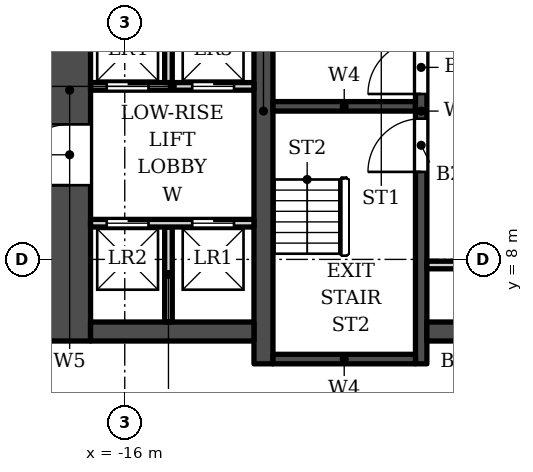
"""IFC4 building model, lengths in metres.
Left out: names, types, materials, properties, quantities, classifications, styles, units other than length and angle.
Written with IfcOpenShell. Run it as: python <this file> out.ifc"""

import sys

from ifc_helpers import new_model, si_unit, direction, frame, frame_2d, origin, place, context, subcontext, project, spatial, rectangle, extrude, element, fill, save


model = new_model("IFC4")
c1 = context("Model", 3, precision=1e-05, world=origin(), true_north=direction((0.0, 1.0)))
c2 = subcontext(c1, "Body", "Model", "MODEL_VIEW")
j1 = project(units=[si_unit("LENGTHUNIT", "METRE"), si_unit("PLANEANGLEUNIT", "RADIAN")], contexts=[c1])
p1 = place(None, origin())
s1 = spatial("IfcSite", under=j1, at=p1, CompositionType="ELEMENT")
p2 = place(p1, origin())
s2 = spatial("IfcBuilding", under=s1, at=p2, CompositionType="ELEMENT")
p3 = place(p2, frame((0.0, 0.0, -10.0)))
s3 = spatial("IfcBuildingStorey", under=s2, at=p3, CompositionType="ELEMENT", Elevation=-10.0)
p4 = place(p3, frame((-12.35, 5.253, -1.6), z_axis=(0.0, 0.0, 1.0), x_axis=(0.0, 1.0, 0.0)))
e1 = element("IfcWall", 1, at=p4, inside=s3, PredefinedType="SHEAR", context=c2, shape_type="SweptSolid", body=[
    extrude(rectangle(XDim=13.3, YDim=0.5, at=frame_2d((6.65, 0.0))), origin(), (0.0, 0.0, 1.0), 6.6),
])
p5 = place(p3, frame((-8.2, 5.253, -1.6), z_axis=(0.0, 0.0, 1.0), x_axis=(0.0, 1.0, 0.0)))
e2 = element("IfcWall", 2, at=p5, inside=s3, PredefinedType="SHEAR", context=c2, shape_type="SweptSolid", body=[
    extrude(rectangle(XDim=13.3, YDim=0.3, at=frame_2d((6.65, 0.0))), origin(), (0.0, 0.0, 1.0), 6.6),
])
p6 = place(p5, frame((7.1, 0.0, 1.6)))
e3 = element("IfcOpeningElement", 3, at=p6, cuts=e2, PredefinedType="OPENING", context=c2, shape_type="SweptSolid", body=[
    extrude(rectangle(XDim=1.4, YDim=2.1, at=frame_2d((0.7, 1.05))), frame((0.0, 0.16, 0.0), z_axis=(0.0, -1.0, 0.0), x_axis=(1.0, 0.0, 0.0)), (0.0, 0.0, 1.0), 0.32),
])
p7 = place(p5, frame((5.05, 0.0, 1.6)))
e4 = element("IfcOpeningElement", 4, at=p7, cuts=e2, PredefinedType="OPENING", context=c2, shape_type="SweptSolid", body=[
    extrude(rectangle(XDim=1.4, YDim=2.1, at=frame_2d((0.7, 1.05))), frame((0.0, 0.16, 0.0), z_axis=(0.0, -1.0, 0.0), x_axis=(1.0, 0.0, 0.0)), (0.0, 0.0, 1.0), 0.32),
])
for number, where, z_axis, x_axis in (
    (5, (-12.1, 12.028, -1.6), (0.0, 0.0, 1.0), (1.0, 0.0, 0.0)),
    (6, (-12.1, 5.378, -1.6), (0.0, 0.0, 1.0), (1.0, 0.0, 0.0)),
):
    element("IfcWall", number, at=place(p3, frame(where, z_axis=z_axis, x_axis=x_axis)), inside=s3, PredefinedType="SHEAR", context=c2, shape_type="SweptSolid", body=[
        extrude(rectangle(XDim=3.75, YDim=0.25, at=frame_2d((1.875, 0.0))), origin(), (0.0, 0.0, 1.0), 6.6),
    ])
p8 = place(p3, frame((-8.05, 6.103, -1.6), z_axis=(0.0, 0.0, 1.0), x_axis=(1.0, 0.0, 0.0)))
e7 = element("IfcWall", 7, at=p8, inside=s3, PredefinedType="SHEAR", context=c2, shape_type="SweptSolid", body=[
    extrude(rectangle(XDim=7.05, YDim=0.5, at=frame_2d((3.525, 0.0))), origin(), (0.0, 0.0, 1.0), 6.6),
])
p9 = place(p8, frame((0.825, 0.0, 1.6)))
e8 = element("IfcOpeningElement", 8, at=p9, cuts=e7, PredefinedType="OPENING", context=c2, shape_type="SweptSolid", body=[
    extrude(rectangle(XDim=0.9, YDim=2.1, at=frame_2d((0.45, 1.05))), frame((0.0, 0.26, 0.0), z_axis=(0.0, -1.0, 0.0), x_axis=(1.0, 0.0, 0.0)), (0.0, 0.0, 1.0), 0.52),
])
p10 = place(p3, frame((-12.6, 6.103, -1.6), z_axis=(0.0, 0.0, 1.0), x_axis=(-1.0, 0.0, 0.0)))
e9 = element("IfcWall", 9, at=p10, inside=s3, PredefinedType="SHEAR", context=c2, shape_type="SweptSolid", body=[
    extrude(rectangle(XDim=4.3, YDim=0.5, at=frame_2d((2.15, 0.0))), origin(), (0.0, 0.0, 1.0), 6.6),
])
p11 = place(p3, frame((-17.45, 5.853, -1.6), z_axis=(0.0, 0.0, 1.0), x_axis=(0.0, 1.0, 0.0)))
e10 = element("IfcWall", 10, at=p11, inside=s3, PredefinedType="SHEAR", context=c2, shape_type="SweptSolid", body=[
    extrude(rectangle(XDim=13.2, YDim=1.1, at=frame_2d((6.6, 0.0))), origin(), (0.0, 0.0, 1.0), 6.6),
])
p12 = place(p11, frame((4.1, 0.0, 1.6)))
e11 = element("IfcOpeningElement", 11, at=p12, cuts=e10, PredefinedType="OPENING", context=c2, shape_type="SweptSolid", body=[
    extrude(rectangle(XDim=1.6, YDim=2.1, at=frame_2d((0.8, 1.05))), frame((0.0, 0.56, 0.0), z_axis=(0.0, -1.0, 0.0), x_axis=(1.0, 0.0, 0.0)), (0.0, 0.0, 1.0), 1.12),
])
p13 = place(p11, frame((9.75, 0.0, 1.6)))
e12 = element("IfcOpeningElement", 12, at=p13, cuts=e10, PredefinedType="OPENING", context=c2, shape_type="SweptSolid", body=[
    extrude(rectangle(XDim=0.9, YDim=2.1, at=frame_2d((0.45, 1.05))), frame((0.0, 0.56, 0.0), z_axis=(0.0, -1.0, 0.0), x_axis=(1.0, 0.0, 0.0)), (0.0, 0.0, 1.0), 1.12),
])
for number, where, z_axis, x_axis in (
    (13, (-14.85, 6.353, 0.0), (0.0, 0.0, 1.0), (0.0, 1.0, 0.0)),
    (14, (-8.05, 7.853, 0.0), (0.0, 0.0, 1.0), (1.0, 0.0, 0.0)),
):
    element("IfcWall", number, at=place(p3, frame(where, z_axis=z_axis, x_axis=x_axis)), inside=s3, PredefinedType="SOLIDWALL", context=c2, shape_type="SweptSolid", body=[
        extrude(rectangle(XDim=2.5, YDim=0.2, at=frame_2d((1.25, 0.0))), origin(), (0.0, 0.0, 1.0), 4.5),
    ])
p14 = place(p3, frame((-16.9, 8.953, 0.0), z_axis=(0.0, 0.0, 1.0), x_axis=(1.0, 0.0, 0.0)))
e15 = element("IfcWall", 15, at=p14, inside=s3, PredefinedType="SOLIDWALL", context=c2, shape_type="SweptSolid", body=[
    extrude(rectangle(XDim=4.3, YDim=0.2, at=frame_2d((2.15, 0.0))), origin(), (0.0, 0.0, 1.0), 4.5),
])
p15 = place(p14, frame((2.675, 0.0, 0.0)))
e16 = element("IfcOpeningElement", 16, at=p15, cuts=e15, PredefinedType="OPENING", context=c2, shape_type="SweptSolid", body=[
    extrude(rectangle(XDim=1.1, YDim=2.1, at=frame_2d((0.55, 1.05))), frame((0.0, 0.11, 0.0), z_axis=(0.0, -1.0, 0.0), x_axis=(1.0, 0.0, 0.0)), (0.0, 0.0, 1.0), 0.22),
])
p16 = place(p14, frame((0.425, 0.0, 0.0)))
e17 = element("IfcOpeningElement", 17, at=p16, cuts=e15, PredefinedType="OPENING", context=c2, shape_type="SweptSolid", body=[
    extrude(rectangle(XDim=1.1, YDim=2.1, at=frame_2d((0.55, 1.05))), frame((0.0, 0.11, 0.0), z_axis=(0.0, -1.0, 0.0), x_axis=(1.0, 0.0, 0.0)), (0.0, 0.0, 1.0), 0.22),
])
p17 = place(p3, frame((-16.9, 12.552, 0.0), z_axis=(0.0, 0.0, 1.0), x_axis=(1.0, 0.0, 0.0)))
e18 = element("IfcWall", 18, at=p17, inside=s3, PredefinedType="SOLIDWALL", context=c2, shape_type="SweptSolid", body=[
    extrude(rectangle(XDim=4.3, YDim=0.2, at=frame_2d((2.15, 0.0))), origin(), (0.0, 0.0, 1.0), 4.5),
])
p18 = place(p17, frame((2.675, 0.0, 0.0)))
e19 = element("IfcOpeningElement", 19, at=p18, cuts=e18, PredefinedType="OPENING", context=c2, shape_type="SweptSolid", body=[
    extrude(rectangle(XDim=1.1, YDim=2.1, at=frame_2d((0.55, 1.05))), frame((0.0, 0.11, 0.0), z_axis=(0.0, -1.0, 0.0), x_axis=(1.0, 0.0, 0.0)), (0.0, 0.0, 1.0), 0.22),
])
p19 = place(p17, frame((0.425, 0.0, 0.0)))
e20 = element("IfcOpeningElement", 20, at=p19, cuts=e18, PredefinedType="OPENING", context=c2, shape_type="SweptSolid", body=[
    extrude(rectangle(XDim=1.1, YDim=2.1, at=frame_2d((0.55, 1.05))), frame((0.0, 0.11, 0.0), z_axis=(0.0, -1.0, 0.0), x_axis=(1.0, 0.0, 0.0)), (0.0, 0.0, 1.0), 0.22),
])
p20 = place(p3, frame((-14.85, 12.653, 0.0), z_axis=(0.0, 0.0, 1.0), x_axis=(0.0, 1.0, 0.0)))
e21 = element("IfcWall", 21, at=p20, inside=s3, PredefinedType="SOLIDWALL", context=c2, shape_type="SweptSolid", body=[
    extrude(rectangle(XDim=2.6, YDim=0.2, at=frame_2d((1.3, 0.0))), origin(), (0.0, 0.0, 1.0), 4.5),
])
p21 = place(p15, origin())
e22 = element("IfcDoor", 22, at=p21, inside=s3, OperationType="DOUBLE_DOOR_SLIDING", PredefinedType="DOOR", context=c2, shape_type="SweptSolid", body=[
    extrude(rectangle(XDim=1.1, YDim=2.1, at=frame_2d((0.55, 1.05))), frame((0.0, 0.025, 0.0), z_axis=(0.0, -1.0, 0.0), x_axis=(1.0, 0.0, 0.0)), (0.0, 0.0, 1.0), 0.05),
])
fill(e16, e22)
p22 = place(p18, origin())
e23 = element("IfcDoor", 23, at=p22, inside=s3, OperationType="DOUBLE_DOOR_SLIDING", PredefinedType="DOOR", context=c2, shape_type="SweptSolid", body=[
    extrude(rectangle(XDim=1.1, YDim=2.1, at=frame_2d((0.55, 1.05))), frame((0.0, 0.025, 0.0), z_axis=(0.0, -1.0, 0.0), x_axis=(1.0, 0.0, 0.0)), (0.0, 0.0, 1.0), 0.05),
])
fill(e19, e23)
p23 = place(p16, origin())
e24 = element("IfcDoor", 24, at=p23, inside=s3, OperationType="DOUBLE_DOOR_SLIDING", PredefinedType="DOOR", context=c2, shape_type="SweptSolid", body=[
    extrude(rectangle(XDim=1.1, YDim=2.1, at=frame_2d((0.55, 1.05))), frame((0.0, 0.025, 0.0), z_axis=(0.0, -1.0, 0.0), x_axis=(1.0, 0.0, 0.0)), (0.0, 0.0, 1.0), 0.05),
])
fill(e17, e24)
p24 = place(p19, origin())
e25 = element("IfcDoor", 25, at=p24, inside=s3, OperationType="DOUBLE_DOOR_SLIDING", PredefinedType="DOOR", context=c2, shape_type="SweptSolid", body=[
    extrude(rectangle(XDim=1.1, YDim=2.1, at=frame_2d((0.55, 1.05))), frame((0.0, 0.025, 0.0), z_axis=(0.0, -1.0, 0.0), x_axis=(1.0, 0.0, 0.0)), (0.0, 0.0, 1.0), 0.05),
])
fill(e20, e25)
p25 = place(p6, origin())
e26 = element("IfcDoor", 26, at=p25, inside=s3, OperationType="SINGLE_SWING_LEFT", PredefinedType="DOOR", context=c2, shape_type="SweptSolid", body=[
    extrude(rectangle(XDim=1.4, YDim=2.1, at=frame_2d((0.7, 1.05))), frame((0.0, 0.025, 0.0), z_axis=(0.0, -1.0, 0.0), x_axis=(1.0, 0.0, 0.0)), (0.0, 0.0, 1.0), 0.05),
])
fill(e3, e26)
p26 = place(p7, origin())
e27 = element("IfcDoor", 27, at=p26, inside=s3, OperationType="SINGLE_SWING_LEFT", PredefinedType="DOOR", context=c2, shape_type="SweptSolid", body=[
    extrude(rectangle(XDim=1.4, YDim=2.1, at=frame_2d((0.7, 1.05))), frame((0.0, 0.025, 0.0), z_axis=(0.0, -1.0, 0.0), x_axis=(1.0, 0.0, 0.0)), (0.0, 0.0, 1.0), 0.05),
])
fill(e4, e27)
p27 = place(p12, origin())
e28 = element("IfcDoor", 28, at=p27, inside=s3, OperationType="DOUBLE_DOOR_SINGLE_SWING", PredefinedType="DOOR", context=c2, shape_type="SweptSolid", body=[
    extrude(rectangle(XDim=1.6, YDim=2.1, at=frame_2d((0.8, 1.05))), frame((0.0, -0.225, 0.0), z_axis=(0.0, -1.0, 0.0), x_axis=(1.0, 0.0, 0.0)), (0.0, 0.0, 1.0), 0.05),
])
fill(e11, e28)
save(model, sys.argv[1])
